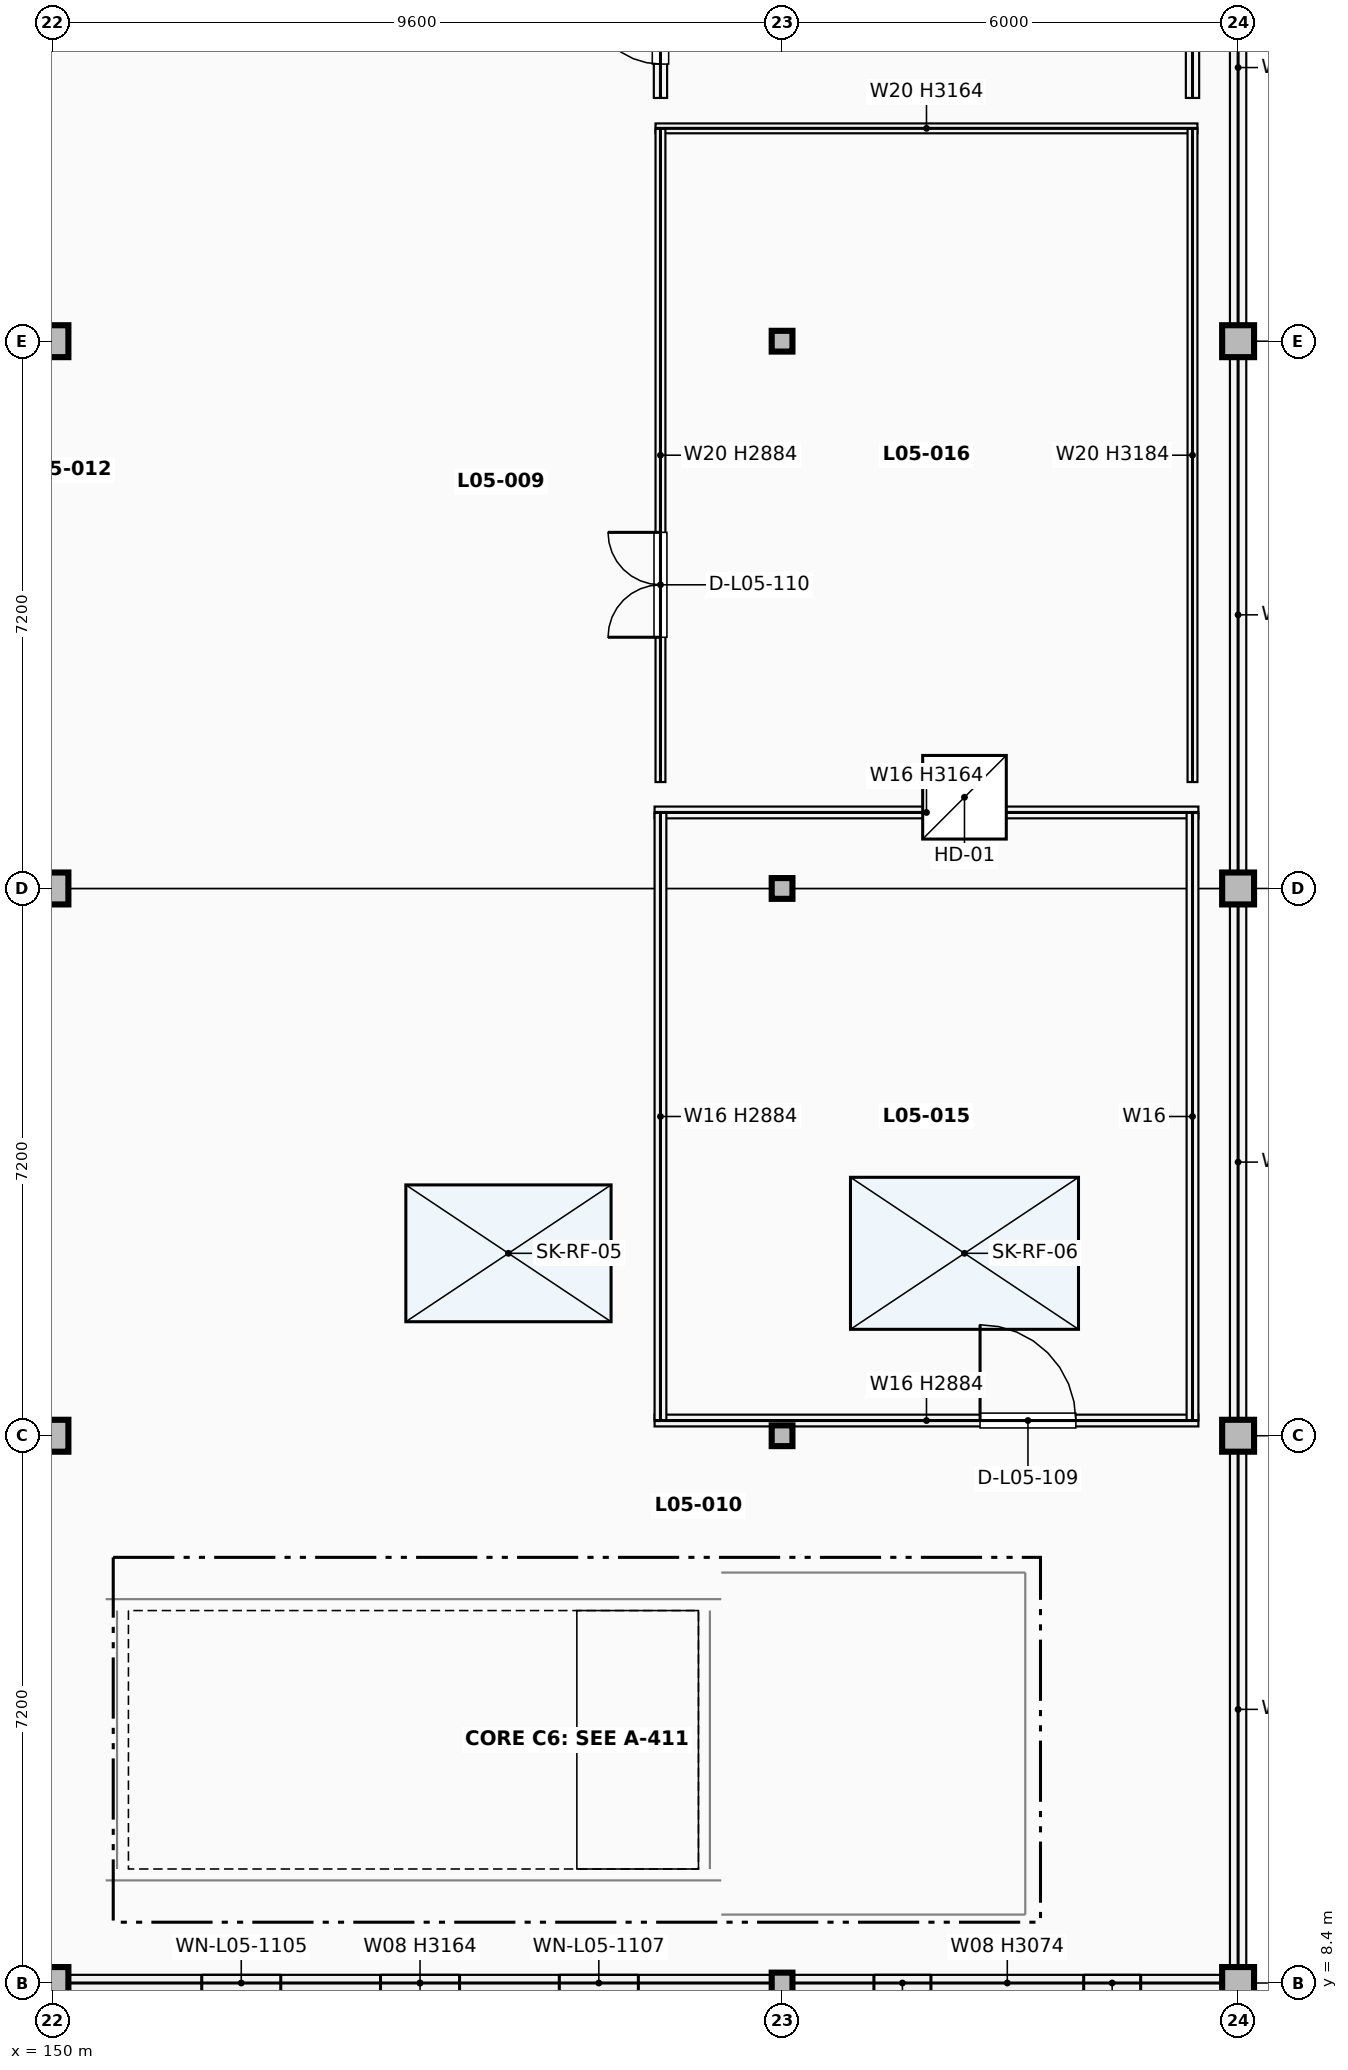
"""IFC4 building model, lengths in metres.
Left out: names, types, materials, properties, quantities, classifications, styles, units other than length and angle.
Written with IfcOpenShell. Run it as: python <this file> out.ifc"""

import sys

from ifc_helpers import new_model, si_unit, direction, frame, frame_2d, origin, origin_2d, place, context, subcontext, project, spatial, rectangle, hollow_circle, extrude, element, fill, save


model = new_model("IFC4")
c1 = context("Model", 3, precision=1e-05, world=origin(), true_north=direction((0.0, 1.0)))
c2 = subcontext(c1, "Body", "Model", "MODEL_VIEW")
j1 = project(units=[si_unit("LENGTHUNIT", "METRE"), si_unit("PLANEANGLEUNIT", "RADIAN")], contexts=[c1])
p1 = place(None, origin())
s1 = spatial("IfcSite", under=j1, at=p1, CompositionType="ELEMENT")
p2 = place(p1, origin())
s2 = spatial("IfcBuilding", under=s1, at=p2, CompositionType="ELEMENT")
p3 = place(p2, frame((0.0, 0.0, 21.08)))
s3 = spatial("IfcBuildingStorey", under=s2, at=p3, CompositionType="ELEMENT", Elevation=21.08)
for number, where, z_axis, x_axis in (
    (1, (150.0, 8.4, 0.0), (0.0, 0.0, 1.0), (1.0, 0.0, 0.0)),
    (2, (150.0, 15.6, 0.0), (0.0, 0.0, 1.0), (1.0, 0.0, 0.0)),
    (3, (150.0, 22.8, 0.0), (0.0, 0.0, 1.0), (1.0, 0.0, 0.0)),
    (4, (150.0, 30.0, 0.0), (0.0, 0.0, 1.0), (1.0, 0.0, 0.0)),
):
    element("IfcColumn", number, at=place(p3, frame(where, z_axis=z_axis, x_axis=x_axis)), inside=s3, PredefinedType="COLUMN", context=c2, shape_type="SweptSolid", body=[
        extrude(rectangle(XDim=0.42, YDim=0.42, at=origin_2d()), origin(), (0.0, 0.0, 1.0), 3.74),
    ])
for number, where, z_axis, x_axis in (
    (5, (159.6, 8.4, 0.0), (0.0, 0.0, 1.0), (1.0, 0.0, 0.0)),
    (6, (159.6, 15.6, 0.0), (0.0, 0.0, 1.0), (1.0, 0.0, 0.0)),
    (7, (159.6, 22.8, 0.0), (0.0, 0.0, 1.0), (1.0, 0.0, 0.0)),
    (8, (159.6, 30.0, 0.0), (0.0, 0.0, 1.0), (1.0, 0.0, 0.0)),
):
    element("IfcColumn", number, at=place(p3, frame(where, z_axis=z_axis, x_axis=x_axis)), inside=s3, PredefinedType="COLUMN", context=c2, shape_type="SweptSolid", body=[
        extrude(hollow_circle(Radius=0.136, WallThickness=0.012, at=origin_2d()), origin(), (0.0, 0.0, 1.0), 3.7),
    ])
for number, where, z_axis, x_axis in (
    (9, (165.6, 8.4, 0.0), (0.0, 0.0, 1.0), (1.0, 0.0, 0.0)),
    (10, (165.6, 15.6, 0.0), (0.0, 0.0, 1.0), (1.0, 0.0, 0.0)),
    (11, (165.6, 22.8, 0.0), (0.0, 0.0, 1.0), (1.0, 0.0, 0.0)),
    (12, (165.6, 30.0, 0.0), (0.0, 0.0, 1.0), (1.0, 0.0, 0.0)),
):
    element("IfcColumn", number, at=place(p3, frame(where, z_axis=z_axis, x_axis=x_axis)), inside=s3, PredefinedType="COLUMN", context=c2, shape_type="SweptSolid", body=[
        extrude(rectangle(XDim=0.42, YDim=0.42, at=origin_2d()), origin(), (0.0, 0.0, 1.0), 3.74),
    ])
for number, where, z_axis, x_axis in (
    (13, (165.6, 8.612, 0.0), (0.0, 0.0, 1.0), (0.0, 1.0, 0.0)),
    (14, (165.6, 15.812, 0.0), (0.0, 0.0, 1.0), (0.0, 1.0, 0.0)),
):
    element("IfcWall", number, at=place(p3, frame(where, z_axis=z_axis, x_axis=x_axis)), inside=s3, PredefinedType="SOLIDWALL", context=c2, shape_type="SweptSolid", body=[
        extrude(rectangle(XDim=6.776, YDim=0.215, at=frame_2d((3.388, 0.0))), origin(), (0.0, 0.0, 1.0), 3.074),
    ])
for number, where, z_axis, x_axis in (
    (15, (165.6, 23.012, 0.0), (0.0, 0.0, 1.0), (0.0, 1.0, 0.0)),
    (16, (165.6, 30.212, 0.0), (0.0, 0.0, 1.0), (0.0, 1.0, 0.0)),
):
    element("IfcWall", number, at=place(p3, frame(where, z_axis=z_axis, x_axis=x_axis)), inside=s3, PredefinedType="SOLIDWALL", context=c2, shape_type="SweptSolid", body=[
        extrude(rectangle(XDim=6.776, YDim=0.215, at=frame_2d((3.388, 0.0))), origin(), (0.0, 0.0, 1.0), 3.074),
    ])
p4 = place(p3, frame((150.212, 8.4, 0.0), z_axis=(0.0, 0.0, 1.0), x_axis=(1.0, 0.0, 0.0)))
e17 = element("IfcWall", 17, at=p4, inside=s3, PredefinedType="SOLIDWALL", context=c2, shape_type="SweptSolid", body=[
    extrude(rectangle(XDim=9.25, YDim=0.215, at=frame_2d((4.625, 0.0))), origin(), (0.0, 0.0, 1.0), 3.164),
])
p5 = place(p4, frame((1.752, 0.0, 0.75)))
e18 = element("IfcOpeningElement", 18, at=p5, cuts=e17, PredefinedType="OPENING", context=c2, shape_type="SweptSolid", body=[
    extrude(rectangle(XDim=1.04, YDim=2.18, at=frame_2d((0.52, 1.09))), frame((0.0, 0.118, 0.0), z_axis=(0.0, -1.0, 0.0), x_axis=(1.0, 0.0, 0.0)), (0.0, 0.0, 1.0), 0.235),
])
p6 = place(p4, frame((4.105, 0.0, 0.75)))
e19 = element("IfcOpeningElement", 19, at=p6, cuts=e17, PredefinedType="OPENING", context=c2, shape_type="SweptSolid", body=[
    extrude(rectangle(XDim=1.04, YDim=2.18, at=frame_2d((0.52, 1.09))), frame((0.0, 0.118, 0.0), z_axis=(0.0, -1.0, 0.0), x_axis=(1.0, 0.0, 0.0)), (0.0, 0.0, 1.0), 0.235),
])
p7 = place(p4, frame((6.457, 0.0, 0.75)))
e20 = element("IfcOpeningElement", 20, at=p7, cuts=e17, PredefinedType="OPENING", context=c2, shape_type="SweptSolid", body=[
    extrude(rectangle(XDim=1.04, YDim=2.18, at=frame_2d((0.52, 1.09))), frame((0.0, 0.118, 0.0), z_axis=(0.0, -1.0, 0.0), x_axis=(1.0, 0.0, 0.0)), (0.0, 0.0, 1.0), 0.235),
])
p8 = place(p3, frame((159.739, 8.4, 0.0), z_axis=(0.0, 0.0, 1.0), x_axis=(1.0, 0.0, 0.0)))
e21 = element("IfcWall", 21, at=p8, inside=s3, PredefinedType="SOLIDWALL", context=c2, shape_type="SweptSolid", body=[
    extrude(rectangle(XDim=5.649, YDim=0.215, at=frame_2d((2.825, 0.0))), origin(), (0.0, 0.0, 1.0), 3.074),
])
p9 = place(p8, frame((1.07, 0.0, 0.75)))
e22 = element("IfcOpeningElement", 22, at=p9, cuts=e21, PredefinedType="OPENING", context=c2, shape_type="SweptSolid", body=[
    extrude(rectangle(XDim=0.75, YDim=2.1, at=frame_2d((0.375, 1.05))), frame((0.0, 0.118, 0.0), z_axis=(0.0, -1.0, 0.0), x_axis=(1.0, 0.0, 0.0)), (0.0, 0.0, 1.0), 0.235),
])
p10 = place(p8, frame((3.83, 0.0, 0.75)))
e23 = element("IfcOpeningElement", 23, at=p10, cuts=e21, PredefinedType="OPENING", context=c2, shape_type="SweptSolid", body=[
    extrude(rectangle(XDim=0.75, YDim=2.1, at=frame_2d((0.375, 1.05))), frame((0.0, 0.118, 0.0), z_axis=(0.0, -1.0, 0.0), x_axis=(1.0, 0.0, 0.0)), (0.0, 0.0, 1.0), 0.235),
])
p11 = place(p3, frame((150.85, 9.9, 0.0), z_axis=(0.0, 0.0, 1.0), x_axis=(0.0, 1.0, 0.0)))
e24 = element("IfcWall", 24, at=p11, inside=s3, PredefinedType="SHEAR", context=c2, shape_type="SweptSolid", body=[
    extrude(rectangle(XDim=3.4, YDim=0.3, at=frame_2d((1.7, 0.0))), origin(), (0.0, 0.0, 1.0), 3.74),
])
for number, where, z_axis, x_axis in (
    (25, (150.7, 9.75, 0.0), (0.0, 0.0, 1.0), (1.0, 0.0, 0.0)),
    (26, (150.7, 13.45, 0.0), (0.0, 0.0, 1.0), (1.0, 0.0, 0.0)),
):
    element("IfcWall", number, at=place(p3, frame(where, z_axis=z_axis, x_axis=x_axis)), inside=s3, PredefinedType="SHEAR", context=c2, shape_type="SweptSolid", body=[
        extrude(rectangle(XDim=8.1, YDim=0.3, at=frame_2d((4.05, 0.0))), origin(), (0.0, 0.0, 1.0), 3.74),
    ])
p12 = place(p3, frame((158.65, 9.9, 0.0), z_axis=(0.0, 0.0, 1.0), x_axis=(0.0, 1.0, 0.0)))
e27 = element("IfcWall", 27, at=p12, inside=s3, PredefinedType="SHEAR", context=c2, shape_type="SweptSolid", body=[
    extrude(rectangle(XDim=3.4, YDim=0.3, at=frame_2d((1.7, 0.0))), origin(), (0.0, 0.0, 1.0), 3.74),
])
p13 = place(p12, frame((1.1, 0.0, 0.0)))
e28 = element("IfcOpeningElement", 28, at=p13, cuts=e27, PredefinedType="OPENING", context=c2, shape_type="SweptSolid", body=[
    extrude(rectangle(XDim=1.2, YDim=2.2, at=frame_2d((0.6, 1.1))), frame((0.0, 0.16, 0.0), z_axis=(0.0, -1.0, 0.0), x_axis=(1.0, 0.0, 0.0)), (0.0, 0.0, 1.0), 0.32),
])
p14 = place(p3, frame((162.8, 9.3, 0.0), z_axis=(0.0, 0.0, 1.0), x_axis=(0.0, 1.0, 0.0)))
e29 = element("IfcWall", 29, at=p14, inside=s3, PredefinedType="PARTITIONING", context=c2, shape_type="SweptSolid", body=[
    extrude(rectangle(XDim=4.5, YDim=0.2, at=frame_2d((2.25, 0.0))), origin(), (0.0, 0.0, 1.0), 3.164),
])
p15 = place(p3, frame((158.8, 9.3, 0.0), z_axis=(0.0, 0.0, 1.0), x_axis=(1.0, 0.0, 0.0)))
e30 = element("IfcWall", 30, at=p15, inside=s3, PredefinedType="PARTITIONING", context=c2, shape_type="SweptSolid", body=[
    extrude(rectangle(XDim=4.0, YDim=0.2, at=frame_2d((2.0, 0.0))), origin(), (0.0, 0.0, 1.0), 3.164),
])
p16 = place(p3, frame((158.8, 13.8, 0.0), z_axis=(0.0, 0.0, 1.0), x_axis=(1.0, 0.0, 0.0)))
e31 = element("IfcWall", 31, at=p16, inside=s3, PredefinedType="PARTITIONING", context=c2, shape_type="SweptSolid", body=[
    extrude(rectangle(XDim=4.0, YDim=0.2, at=frame_2d((2.0, 0.0))), origin(), (0.0, 0.0, 1.0), 3.164),
])
p17 = place(p16, frame((1.275, 0.0, 0.0)))
e32 = element("IfcOpeningElement", 32, at=p17, cuts=e31, PredefinedType="OPENING", context=c2, shape_type="SweptSolid", body=[
    extrude(rectangle(XDim=1.45, YDim=2.2, at=frame_2d((0.725, 1.1))), frame((0.0, 0.11, 0.0), z_axis=(0.0, -1.0, 0.0), x_axis=(1.0, 0.0, 0.0)), (0.0, 0.0, 1.0), 0.22),
])
p18 = place(p3, frame((157.923, 15.8, 0.0), z_axis=(0.0, 0.0, 1.0), x_axis=(1.0, 0.0, 0.0)))
e33 = element("IfcWall", 33, at=p18, inside=s3, PredefinedType="PARTITIONING", context=c2, shape_type="SweptSolid", body=[
    extrude(rectangle(XDim=7.155, YDim=0.155, at=frame_2d((3.577, 0.0))), origin(), (0.0, 0.0, 1.0), 2.884),
])
p19 = place(p18, frame((4.282, 0.0, 0.0)))
e34 = element("IfcOpeningElement", 34, at=p19, cuts=e33, PredefinedType="OPENING", context=c2, shape_type="SweptSolid", body=[
    extrude(rectangle(XDim=1.26, YDim=2.26, at=frame_2d((0.63, 1.13))), frame((0.0, 0.087, 0.0), z_axis=(0.0, -1.0, 0.0), x_axis=(1.0, 0.0, 0.0)), (0.0, 0.0, 1.0), 0.175),
])
p20 = place(p3, frame((157.923, 23.8, 0.0), z_axis=(0.0, 0.0, 1.0), x_axis=(1.0, 0.0, 0.0)))
e35 = element("IfcWall", 35, at=p20, inside=s3, PredefinedType="PARTITIONING", context=c2, shape_type="SweptSolid", body=[
    extrude(rectangle(XDim=7.155, YDim=0.155, at=frame_2d((3.577, 0.0))), origin(), (0.0, 0.0, 1.0), 3.164),
])
p21 = place(p3, frame((158.0, 15.8, 0.0), z_axis=(0.0, 0.0, 1.0), x_axis=(0.0, 1.0, 0.0)))
e36 = element("IfcWall", 36, at=p21, inside=s3, PredefinedType="PARTITIONING", context=c2, shape_type="SweptSolid", body=[
    extrude(rectangle(XDim=8.0, YDim=0.155, at=frame_2d((4.0, 0.0))), origin(), (0.0, 0.0, 1.0), 2.884),
])
p22 = place(p3, frame((165.0, 15.8, 0.0), z_axis=(0.0, 0.0, 1.0), x_axis=(0.0, 1.0, 0.0)))
e37 = element("IfcWall", 37, at=p22, inside=s3, PredefinedType="PARTITIONING", context=c2, shape_type="SweptSolid", body=[
    extrude(rectangle(XDim=8.0, YDim=0.155, at=frame_2d((4.0, 0.0))), origin(), (0.0, 0.0, 1.0), 3.184),
])
p23 = place(p3, frame((157.935, 32.8, 0.0), z_axis=(0.0, 0.0, 1.0), x_axis=(1.0, 0.0, 0.0)))
e38 = element("IfcWall", 38, at=p23, inside=s3, PredefinedType="PARTITIONING", context=c2, shape_type="SweptSolid", body=[
    extrude(rectangle(XDim=7.13, YDim=0.13, at=frame_2d((3.565, 0.0))), origin(), (0.0, 0.0, 1.0), 3.164),
])
p24 = place(p3, frame((158.0, 24.2, 0.0), z_axis=(0.0, 0.0, 1.0), x_axis=(0.0, 1.0, 0.0)))
e39 = element("IfcWall", 39, at=p24, inside=s3, PredefinedType="PARTITIONING", context=c2, shape_type="SweptSolid", body=[
    extrude(rectangle(XDim=8.6, YDim=0.13, at=frame_2d((4.3, 0.0))), origin(), (0.0, 0.0, 1.0), 2.884),
])
p25 = place(p24, frame((1.905, 0.0, 0.0)))
e40 = element("IfcOpeningElement", 40, at=p25, cuts=e39, PredefinedType="OPENING", context=c2, shape_type="SweptSolid", body=[
    extrude(rectangle(XDim=1.38, YDim=2.28, at=frame_2d((0.69, 1.14))), frame((0.0, 0.075, 0.0), z_axis=(0.0, -1.0, 0.0), x_axis=(1.0, 0.0, 0.0)), (0.0, 0.0, 1.0), 0.15),
])
p26 = place(p3, frame((165.0, 24.2, 0.0), z_axis=(0.0, 0.0, 1.0), x_axis=(0.0, 1.0, 0.0)))
e41 = element("IfcWall", 41, at=p26, inside=s3, PredefinedType="PARTITIONING", context=c2, shape_type="SweptSolid", body=[
    extrude(rectangle(XDim=8.6, YDim=0.13, at=frame_2d((4.3, 0.0))), origin(), (0.0, 0.0, 1.0), 3.184),
])
p27 = place(p3, frame((158.0, 33.2, 0.0), z_axis=(0.0, 0.0, 1.0), x_axis=(0.0, 1.0, 0.0)))
e42 = element("IfcWall", 42, at=p27, inside=s3, PredefinedType="PARTITIONING", context=c2, shape_type="SweptSolid", body=[
    extrude(rectangle(XDim=3.8, YDim=0.175, at=frame_2d((1.9, 0.0))), origin(), (0.0, 0.0, 1.0), 2.884),
])
p28 = place(p27, frame((0.446, 0.0, 0.0)))
e43 = element("IfcOpeningElement", 43, at=p28, cuts=e42, PredefinedType="OPENING", context=c2, shape_type="SweptSolid", body=[
    extrude(rectangle(XDim=0.94, YDim=2.1, at=frame_2d((0.47, 1.05))), frame((0.0, 0.098, 0.0), z_axis=(0.0, -1.0, 0.0), x_axis=(1.0, 0.0, 0.0)), (0.0, 0.0, 1.0), 0.195),
])
p29 = place(p3, frame((165.0, 33.2, 0.0), z_axis=(0.0, 0.0, 1.0), x_axis=(0.0, 1.0, 0.0)))
e44 = element("IfcWall", 44, at=p29, inside=s3, PredefinedType="PARTITIONING", context=c2, shape_type="SweptSolid", body=[
    extrude(rectangle(XDim=3.8, YDim=0.175, at=frame_2d((1.9, 0.0))), origin(), (0.0, 0.0, 1.0), 3.184),
])
p30 = place(p5, origin())
e45 = element("IfcWindow", 45, at=p30, inside=s3, PartitioningType="SINGLE_PANEL", PredefinedType="WINDOW", context=c2, shape_type="SweptSolid", body=[
    extrude(rectangle(XDim=1.04, YDim=2.18, at=frame_2d((0.52, 1.09))), frame((0.0, 0.03, 0.0), z_axis=(0.0, -1.0, 0.0), x_axis=(1.0, 0.0, 0.0)), (0.0, 0.0, 1.0), 0.06),
])
fill(e18, e45)
p31 = place(p6, origin())
e46 = element("IfcWindow", 46, at=p31, inside=s3, PartitioningType="SINGLE_PANEL", PredefinedType="WINDOW", context=c2, shape_type="SweptSolid", body=[
    extrude(rectangle(XDim=1.04, YDim=2.18, at=frame_2d((0.52, 1.09))), frame((0.0, 0.03, 0.0), z_axis=(0.0, -1.0, 0.0), x_axis=(1.0, 0.0, 0.0)), (0.0, 0.0, 1.0), 0.06),
])
fill(e19, e46)
p32 = place(p7, origin())
e47 = element("IfcWindow", 47, at=p32, inside=s3, PartitioningType="SINGLE_PANEL", PredefinedType="WINDOW", context=c2, shape_type="SweptSolid", body=[
    extrude(rectangle(XDim=1.04, YDim=2.18, at=frame_2d((0.52, 1.09))), frame((0.0, 0.03, 0.0), z_axis=(0.0, -1.0, 0.0), x_axis=(1.0, 0.0, 0.0)), (0.0, 0.0, 1.0), 0.06),
])
fill(e20, e47)
p33 = place(p9, origin())
e48 = element("IfcWindow", 48, at=p33, inside=s3, PartitioningType="SINGLE_PANEL", PredefinedType="WINDOW", context=c2, shape_type="SweptSolid", body=[
    extrude(rectangle(XDim=0.75, YDim=2.1, at=frame_2d((0.375, 1.05))), frame((0.0, 0.03, 0.0), z_axis=(0.0, -1.0, 0.0), x_axis=(1.0, 0.0, 0.0)), (0.0, 0.0, 1.0), 0.06),
])
fill(e22, e48)
p34 = place(p10, origin())
e49 = element("IfcWindow", 49, at=p34, inside=s3, PartitioningType="SINGLE_PANEL", PredefinedType="WINDOW", context=c2, shape_type="SweptSolid", body=[
    extrude(rectangle(XDim=0.75, YDim=2.1, at=frame_2d((0.375, 1.05))), frame((0.0, 0.03, 0.0), z_axis=(0.0, -1.0, 0.0), x_axis=(1.0, 0.0, 0.0)), (0.0, 0.0, 1.0), 0.06),
])
fill(e23, e49)
p35 = place(p2, frame((0.0, 0.0, 24.82)))
p36 = place(p35, frame((0.0, 0.0, -0.18)))
p37 = place(p36, frame((156.0, 18.0, 0.12)))
e50 = element("IfcWindow", 50, at=p37, inside=s3, PartitioningType="SINGLE_PANEL", PredefinedType="SKYLIGHT", context=c2, shape_type="SweptSolid", body=[
    extrude(rectangle(XDim=2.7, YDim=1.8, at=origin_2d()), origin(), (0.0, 0.0, 1.0), 0.06),
])
p38 = place(p36, frame((162.0, 18.0, 0.12)))
e51 = element("IfcWindow", 51, at=p38, inside=s3, PartitioningType="SINGLE_PANEL", PredefinedType="SKYLIGHT", context=c2, shape_type="SweptSolid", body=[
    extrude(rectangle(XDim=3.0, YDim=2.0, at=origin_2d()), origin(), (0.0, 0.0, 1.0), 0.06),
])
p39 = place(p36, frame((162.0, 24.0, 0.12)))
e52 = element("IfcDoor", 52, at=p39, inside=s3, OperationType="SINGLE_SWING_LEFT", PredefinedType="TRAPDOOR", context=c2, shape_type="SweptSolid", body=[
    extrude(rectangle(XDim=1.1, YDim=1.1, at=origin_2d()), origin(), (0.0, 0.0, 1.0), 0.06),
])
p40 = place(p13, origin())
e53 = element("IfcDoor", 53, at=p40, inside=s3, OperationType="SINGLE_SWING_RIGHT", PredefinedType="DOOR", context=c2, shape_type="SweptSolid", body=[
    extrude(rectangle(XDim=1.2, YDim=2.2, at=frame_2d((0.6, 1.1))), frame((0.0, 0.025, 0.0), z_axis=(0.0, -1.0, 0.0), x_axis=(1.0, 0.0, 0.0)), (0.0, 0.0, 1.0), 0.05),
])
fill(e28, e53)
p41 = place(p17, origin())
e54 = element("IfcDoor", 54, at=p41, inside=s3, OperationType="DOUBLE_DOOR_SINGLE_SWING", PredefinedType="DOOR", context=c2, shape_type="SweptSolid", body=[
    extrude(rectangle(XDim=1.45, YDim=2.2, at=frame_2d((0.725, 1.1))), frame((0.0, 0.025, 0.0), z_axis=(0.0, -1.0, 0.0), x_axis=(1.0, 0.0, 0.0)), (0.0, 0.0, 1.0), 0.05),
])
fill(e32, e54)
p42 = place(p19, origin())
e55 = element("IfcDoor", 55, at=p42, inside=s3, OperationType="SINGLE_SWING_LEFT", PredefinedType="DOOR", context=c2, shape_type="SweptSolid", body=[
    extrude(rectangle(XDim=1.26, YDim=2.26, at=frame_2d((0.63, 1.13))), frame((0.0, 0.025, 0.0), z_axis=(0.0, -1.0, 0.0), x_axis=(1.0, 0.0, 0.0)), (0.0, 0.0, 1.0), 0.05),
])
fill(e34, e55)
p43 = place(p25, origin())
e56 = element("IfcDoor", 56, at=p43, inside=s3, OperationType="DOUBLE_DOOR_SINGLE_SWING", PredefinedType="DOOR", context=c2, shape_type="SweptSolid", body=[
    extrude(rectangle(XDim=1.38, YDim=2.28, at=frame_2d((0.69, 1.14))), frame((0.0, 0.025, 0.0), z_axis=(0.0, -1.0, 0.0), x_axis=(1.0, 0.0, 0.0)), (0.0, 0.0, 1.0), 0.05),
])
fill(e40, e56)
p44 = place(p28, origin())
e57 = element("IfcDoor", 57, at=p44, inside=s3, OperationType="SINGLE_SWING_RIGHT", PredefinedType="DOOR", context=c2, shape_type="SweptSolid", body=[
    extrude(rectangle(XDim=0.94, YDim=2.1, at=frame_2d((0.47, 1.05))), frame((0.0, 0.025, 0.0), z_axis=(0.0, -1.0, 0.0), x_axis=(1.0, 0.0, 0.0)), (0.0, 0.0, 1.0), 0.05),
])
fill(e43, e57)
save(model, sys.argv[1])
